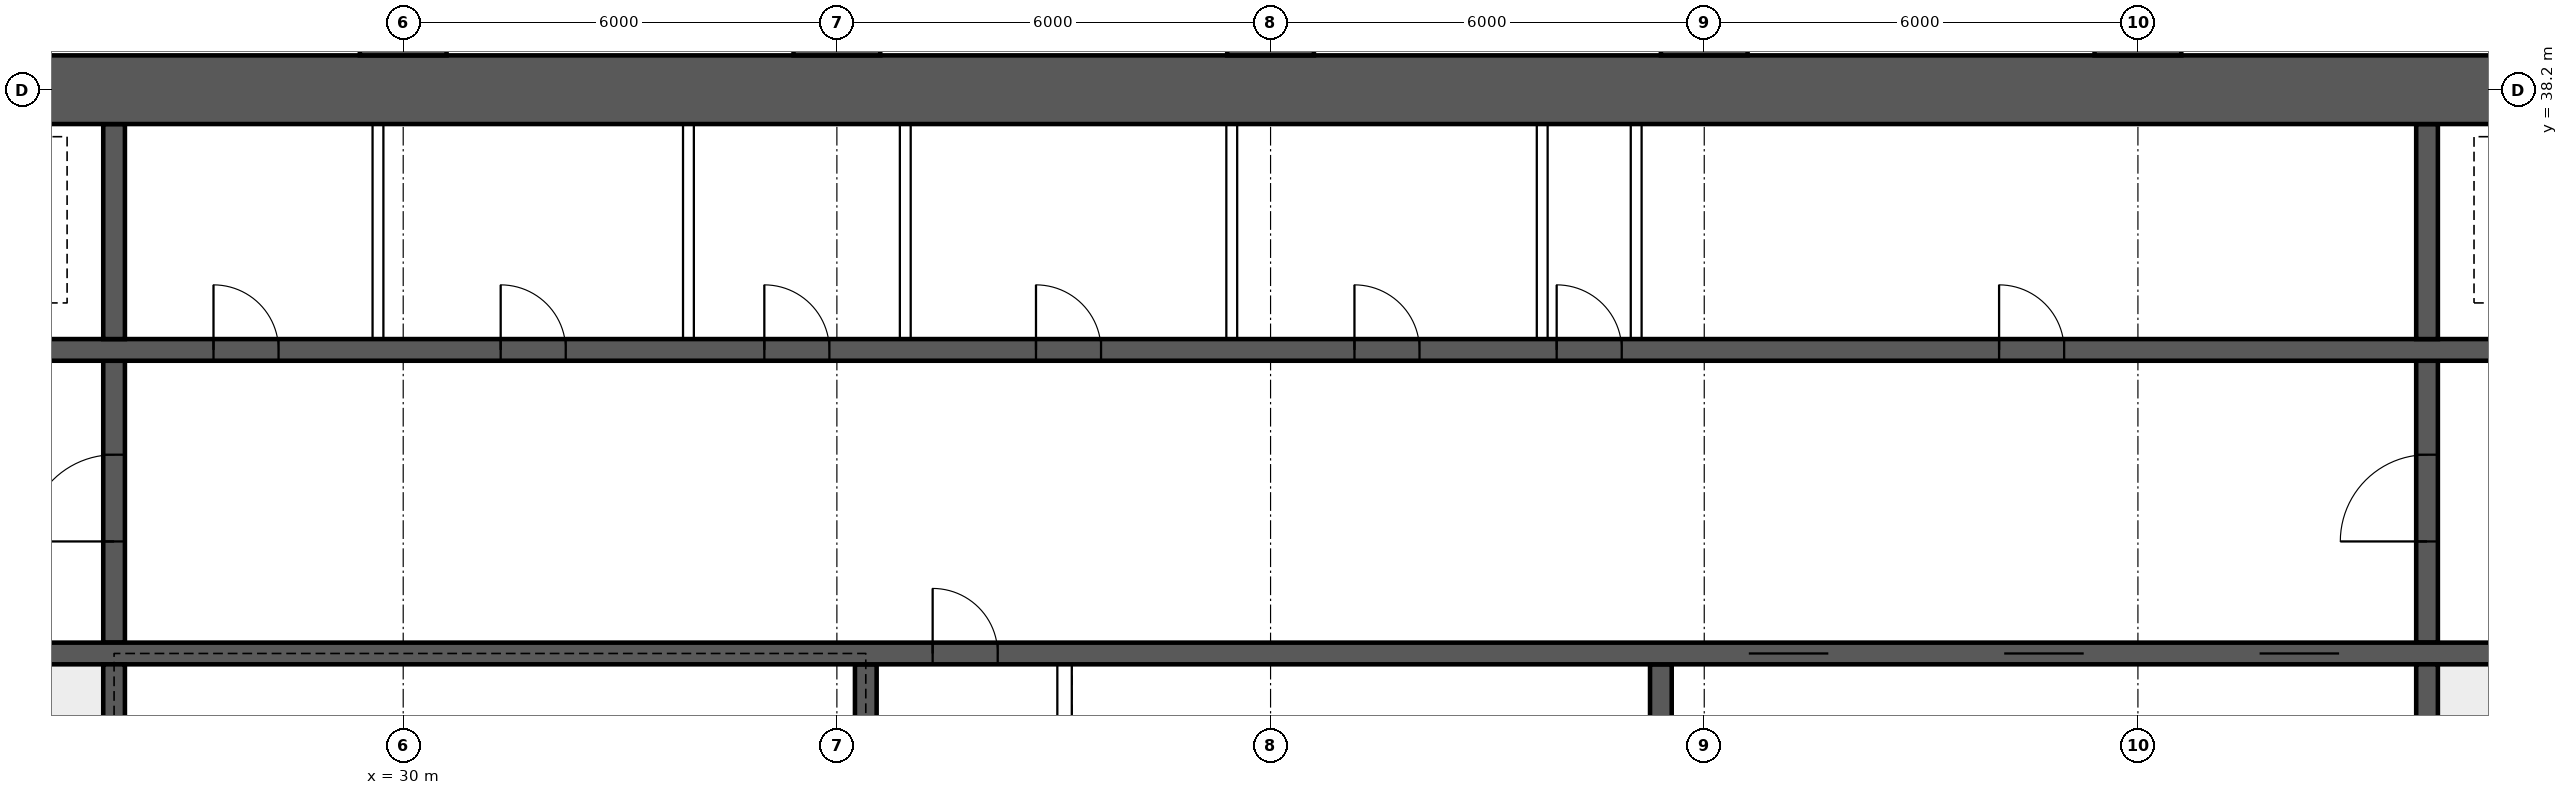
"""IFC4 building model, lengths in metres.
Left out: names, types, materials, properties, quantities, classifications, styles, units other than length and angle.
Written with IfcOpenShell. Run it as: python <this file> out.ifc"""

import sys

from ifc_helpers import new_model, si_unit, direction, frame, frame_2d, origin, place, context, subcontext, project, spatial, rectangle, extrude, element, fill, save


model = new_model("IFC4")
c1 = context("Model", 3, precision=1e-05, world=origin(), true_north=direction((0.0, 1.0)))
c2 = subcontext(c1, "Body", "Model", "MODEL_VIEW")
j1 = project(units=[si_unit("LENGTHUNIT", "METRE"), si_unit("PLANEANGLEUNIT", "RADIAN")], contexts=[c1])
p1 = place(None, origin())
s1 = spatial("IfcSite", under=j1, at=p1, CompositionType="ELEMENT")
p2 = place(p1, origin())
s2 = spatial("IfcBuilding", under=s1, at=p2, CompositionType="ELEMENT")
p3 = place(p2, frame((0.0, 0.0, 133.15)))
s3 = spatial("IfcBuildingStorey", under=s2, at=p3, CompositionType="ELEMENT", Elevation=133.15)
p4 = place(p3, frame((18.0, 38.2, 0.0), z_axis=(0.0, 0.0, 1.0), x_axis=(1.0, 0.0, 0.0)))
e1 = element("IfcWall", 1, at=p4, inside=s3, PredefinedType="SHEAR", context=c2, shape_type="SweptSolid", body=[
    extrude(rectangle(XDim=48.0, YDim=0.95, at=frame_2d((24.0, 0.0))), origin(), (0.0, 0.0, 1.0), 7.2),
])
p5 = place(p3, frame((18.475, 30.4, 0.0), z_axis=(0.0, 0.0, 1.0), x_axis=(1.0, 0.0, 0.0)))
e2 = element("IfcWall", 2, at=p5, inside=s3, PredefinedType="SHEAR", context=c2, shape_type="SweptSolid", body=[
    extrude(rectangle(XDim=47.05, YDim=0.3, at=frame_2d((23.525, 0.0))), origin(), (0.0, 0.0, 1.0), 7.2),
])
p6 = place(p5, frame((0.4, 0.0, 0.0)))
e3 = element("IfcOpeningElement", 3, at=p6, cuts=e2, PredefinedType="OPENING", context=c2, shape_type="SweptSolid", body=[
    extrude(rectangle(XDim=1.0, YDim=2.1, at=frame_2d((0.5, 1.05))), frame((0.0, 0.16, 0.0), z_axis=(0.0, -1.0, 0.0), x_axis=(1.0, 0.0, 0.0)), (0.0, 0.0, 1.0), 0.32),
])
p7 = place(p5, frame((45.65, 0.0, 0.0)))
e4 = element("IfcOpeningElement", 4, at=p7, cuts=e2, PredefinedType="OPENING", context=c2, shape_type="SweptSolid", body=[
    extrude(rectangle(XDim=1.0, YDim=2.1, at=frame_2d((0.5, 1.05))), frame((0.0, 0.16, 0.0), z_axis=(0.0, -1.0, 0.0), x_axis=(1.0, 0.0, 0.0)), (0.0, 0.0, 1.0), 0.32),
])
p8 = place(p5, frame((18.85, 0.0, 0.0)))
e5 = element("IfcOpeningElement", 5, at=p8, cuts=e2, PredefinedType="OPENING", context=c2, shape_type="SweptSolid", body=[
    extrude(rectangle(XDim=0.9, YDim=2.1, at=frame_2d((0.45, 1.05))), frame((0.0, 0.16, 0.0), z_axis=(0.0, -1.0, 0.0), x_axis=(1.0, 0.0, 0.0)), (0.0, 0.0, 1.0), 0.32),
])
p9 = place(p5, frame((30.142, 0.0, 0.0)))
e6 = element("IfcOpeningElement", 6, at=p9, cuts=e2, PredefinedType="OPENING", context=c2, shape_type="SweptSolid", body=[
    extrude(rectangle(XDim=1.1, YDim=2.1, at=frame_2d((0.55, 1.05))), frame((0.0, 0.16, 0.0), z_axis=(0.0, -1.0, 0.0), x_axis=(1.0, 0.0, 0.0)), (0.0, 0.0, 1.0), 0.32),
])
p10 = place(p5, frame((33.675, 0.0, 0.0)))
e7 = element("IfcOpeningElement", 7, at=p10, cuts=e2, PredefinedType="OPENING", context=c2, shape_type="SweptSolid", body=[
    extrude(rectangle(XDim=1.1, YDim=2.1, at=frame_2d((0.55, 1.05))), frame((0.0, 0.16, 0.0), z_axis=(0.0, -1.0, 0.0), x_axis=(1.0, 0.0, 0.0)), (0.0, 0.0, 1.0), 0.32),
])
p11 = place(p5, frame((37.208, 0.0, 0.0)))
e8 = element("IfcOpeningElement", 8, at=p11, cuts=e2, PredefinedType="OPENING", context=c2, shape_type="SweptSolid", body=[
    extrude(rectangle(XDim=1.1, YDim=2.1, at=frame_2d((0.55, 1.05))), frame((0.0, 0.16, 0.0), z_axis=(0.0, -1.0, 0.0), x_axis=(1.0, 0.0, 0.0)), (0.0, 0.0, 1.0), 0.32),
])
p12 = place(p3, frame((18.475, 34.6, 0.0), z_axis=(0.0, 0.0, 1.0), x_axis=(1.0, 0.0, 0.0)))
e9 = element("IfcWall", 9, at=p12, inside=s3, PredefinedType="SHEAR", context=c2, shape_type="SweptSolid", body=[
    extrude(rectangle(XDim=47.05, YDim=0.3, at=frame_2d((23.525, 0.0))), origin(), (0.0, 0.0, 1.0), 7.2),
])
p13 = place(p12, frame((0.9, 0.0, 0.0)))
e10 = element("IfcOpeningElement", 10, at=p13, cuts=e9, PredefinedType="OPENING", context=c2, shape_type="SweptSolid", body=[
    extrude(rectangle(XDim=1.1, YDim=2.1, at=frame_2d((0.55, 1.05))), frame((0.0, 0.16, 0.0), z_axis=(0.0, -1.0, 0.0), x_axis=(1.0, 0.0, 0.0)), (0.0, 0.0, 1.0), 0.32),
])
p14 = place(p12, frame((45.05, 0.0, 0.0)))
e11 = element("IfcOpeningElement", 11, at=p14, cuts=e9, PredefinedType="OPENING", context=c2, shape_type="SweptSolid", body=[
    extrude(rectangle(XDim=1.1, YDim=2.1, at=frame_2d((0.55, 1.05))), frame((0.0, 0.16, 0.0), z_axis=(0.0, -1.0, 0.0), x_axis=(1.0, 0.0, 0.0)), (0.0, 0.0, 1.0), 0.32),
])
p15 = place(p12, frame((4.125, 0.0, 0.0)))
e12 = element("IfcOpeningElement", 12, at=p15, cuts=e9, PredefinedType="OPENING", context=c2, shape_type="SweptSolid", body=[
    extrude(rectangle(XDim=0.9, YDim=2.1, at=frame_2d((0.45, 1.05))), frame((0.0, 0.16, 0.0), z_axis=(0.0, -1.0, 0.0), x_axis=(1.0, 0.0, 0.0)), (0.0, 0.0, 1.0), 0.32),
])
p16 = place(p12, frame((42.025, 0.0, 0.0)))
e13 = element("IfcOpeningElement", 13, at=p16, cuts=e9, PredefinedType="OPENING", context=c2, shape_type="SweptSolid", body=[
    extrude(rectangle(XDim=0.9, YDim=2.1, at=frame_2d((0.45, 1.05))), frame((0.0, 0.16, 0.0), z_axis=(0.0, -1.0, 0.0), x_axis=(1.0, 0.0, 0.0)), (0.0, 0.0, 1.0), 0.32),
])
p17 = place(p12, frame((8.9, 0.0, 0.0)))
e14 = element("IfcOpeningElement", 14, at=p17, cuts=e9, PredefinedType="OPENING", context=c2, shape_type="SweptSolid", body=[
    extrude(rectangle(XDim=0.9, YDim=2.1, at=frame_2d((0.45, 1.05))), frame((0.0, 0.16, 0.0), z_axis=(0.0, -1.0, 0.0), x_axis=(1.0, 0.0, 0.0)), (0.0, 0.0, 1.0), 0.32),
])
p18 = place(p12, frame((12.874, 0.0, 0.0)))
e15 = element("IfcOpeningElement", 15, at=p18, cuts=e9, PredefinedType="OPENING", context=c2, shape_type="SweptSolid", body=[
    extrude(rectangle(XDim=0.9, YDim=2.1, at=frame_2d((0.45, 1.05))), frame((0.0, 0.16, 0.0), z_axis=(0.0, -1.0, 0.0), x_axis=(1.0, 0.0, 0.0)), (0.0, 0.0, 1.0), 0.32),
])
p19 = place(p12, frame((16.521, 0.0, 0.0)))
e16 = element("IfcOpeningElement", 16, at=p19, cuts=e9, PredefinedType="OPENING", context=c2, shape_type="SweptSolid", body=[
    extrude(rectangle(XDim=0.9, YDim=2.1, at=frame_2d((0.45, 1.05))), frame((0.0, 0.16, 0.0), z_axis=(0.0, -1.0, 0.0), x_axis=(1.0, 0.0, 0.0)), (0.0, 0.0, 1.0), 0.32),
])
p20 = place(p12, frame((20.28, 0.0, 0.0)))
e17 = element("IfcOpeningElement", 17, at=p20, cuts=e9, PredefinedType="OPENING", context=c2, shape_type="SweptSolid", body=[
    extrude(rectangle(XDim=0.9, YDim=2.1, at=frame_2d((0.45, 1.05))), frame((0.0, 0.16, 0.0), z_axis=(0.0, -1.0, 0.0), x_axis=(1.0, 0.0, 0.0)), (0.0, 0.0, 1.0), 0.32),
])
p21 = place(p12, frame((24.686, 0.0, 0.0)))
e18 = element("IfcOpeningElement", 18, at=p21, cuts=e9, PredefinedType="OPENING", context=c2, shape_type="SweptSolid", body=[
    extrude(rectangle(XDim=0.9, YDim=2.1, at=frame_2d((0.45, 1.05))), frame((0.0, 0.16, 0.0), z_axis=(0.0, -1.0, 0.0), x_axis=(1.0, 0.0, 0.0)), (0.0, 0.0, 1.0), 0.32),
])
p22 = place(p12, frame((27.483, 0.0, 0.0)))
e19 = element("IfcOpeningElement", 19, at=p22, cuts=e9, PredefinedType="OPENING", context=c2, shape_type="SweptSolid", body=[
    extrude(rectangle(XDim=0.9, YDim=2.1, at=frame_2d((0.45, 1.05))), frame((0.0, 0.16, 0.0), z_axis=(0.0, -1.0, 0.0), x_axis=(1.0, 0.0, 0.0)), (0.0, 0.0, 1.0), 0.32),
])
p23 = place(p12, frame((33.604, 0.0, 0.0)))
e20 = element("IfcOpeningElement", 20, at=p23, cuts=e9, PredefinedType="OPENING", context=c2, shape_type="SweptSolid", body=[
    extrude(rectangle(XDim=0.9, YDim=2.1, at=frame_2d((0.45, 1.05))), frame((0.0, 0.16, 0.0), z_axis=(0.0, -1.0, 0.0), x_axis=(1.0, 0.0, 0.0)), (0.0, 0.0, 1.0), 0.32),
])
for number, where, z_axis, x_axis in (
    (21, (26.0, 26.275, 0.0), (0.0, 0.0, 1.0), (0.0, 1.0, 0.0)),
    (22, (58.0, 26.275, 0.0), (0.0, 0.0, 1.0), (0.0, 1.0, 0.0)),
):
    element("IfcWall", number, at=place(p3, frame(where, z_axis=z_axis, x_axis=x_axis)), inside=s3, PredefinedType="SHEAR", context=c2, shape_type="SweptSolid", body=[
        extrude(rectangle(XDim=3.975, YDim=0.3, at=frame_2d((1.988, 0.0))), origin(), (0.0, 0.0, 1.0), 7.2),
    ])
p24 = place(p3, frame((26.0, 30.55, 0.0), z_axis=(0.0, 0.0, 1.0), x_axis=(0.0, 1.0, 0.0)))
e23 = element("IfcWall", 23, at=p24, inside=s3, PredefinedType="SHEAR", context=c2, shape_type="SweptSolid", body=[
    extrude(rectangle(XDim=3.9, YDim=0.3, at=frame_2d((1.95, 0.0))), origin(), (0.0, 0.0, 1.0), 7.2),
])
p25 = place(p24, frame((1.4, 0.0, 0.0)))
e24 = element("IfcOpeningElement", 24, at=p25, cuts=e23, PredefinedType="OPENING", context=c2, shape_type="SweptSolid", body=[
    extrude(rectangle(XDim=1.2, YDim=2.1, at=frame_2d((0.6, 1.05))), frame((0.0, 0.16, 0.0), z_axis=(0.0, -1.0, 0.0), x_axis=(1.0, 0.0, 0.0)), (0.0, 0.0, 1.0), 0.32),
])
p26 = place(p3, frame((58.0, 30.55, 0.0), z_axis=(0.0, 0.0, 1.0), x_axis=(0.0, 1.0, 0.0)))
e25 = element("IfcWall", 25, at=p26, inside=s3, PredefinedType="SHEAR", context=c2, shape_type="SweptSolid", body=[
    extrude(rectangle(XDim=3.9, YDim=0.3, at=frame_2d((1.95, 0.0))), origin(), (0.0, 0.0, 1.0), 7.2),
])
p27 = place(p26, frame((1.4, 0.0, 0.0)))
e26 = element("IfcOpeningElement", 26, at=p27, cuts=e25, PredefinedType="OPENING", context=c2, shape_type="SweptSolid", body=[
    extrude(rectangle(XDim=1.2, YDim=2.1, at=frame_2d((0.6, 1.05))), frame((0.0, 0.16, 0.0), z_axis=(0.0, -1.0, 0.0), x_axis=(1.0, 0.0, 0.0)), (0.0, 0.0, 1.0), 0.32),
])
for number, where, z_axis, x_axis in (
    (27, (26.0, 34.75, 0.0), (0.0, 0.0, 1.0), (0.0, 1.0, 0.0)),
    (28, (58.0, 34.75, 0.0), (0.0, 0.0, 1.0), (0.0, 1.0, 0.0)),
):
    element("IfcWall", number, at=place(p3, frame(where, z_axis=z_axis, x_axis=x_axis)), inside=s3, PredefinedType="SHEAR", context=c2, shape_type="SweptSolid", body=[
        extrude(rectangle(XDim=2.975, YDim=0.3, at=frame_2d((1.488, 0.0))), origin(), (0.0, 0.0, 1.0), 7.2),
    ])
for number, where, z_axis, x_axis in (
    (29, (36.4, 26.275, 0.0), (0.0, 0.0, 1.0), (0.0, 1.0, 0.0)),
    (30, (47.4, 26.275, 0.0), (0.0, 0.0, 1.0), (0.0, 1.0, 0.0)),
):
    element("IfcWall", number, at=place(p3, frame(where, z_axis=z_axis, x_axis=x_axis)), inside=s3, PredefinedType="SHEAR", context=c2, shape_type="SweptSolid", body=[
        extrude(rectangle(XDim=3.975, YDim=0.3, at=frame_2d((1.988, 0.0))), origin(), (0.0, 0.0, 1.0), 7.2),
    ])
p28 = place(p3, frame((30.0, 38.675, 0.0), z_axis=(0.0, 0.0, 1.0), x_axis=(0.0, 1.0, 0.0)))
e31 = element("IfcWall", 31, at=p28, inside=s3, PredefinedType="SHEAR", context=c2, shape_type="SweptSolid", body=[
    extrude(rectangle(XDim=16.425, YDim=1.2, at=frame_2d((8.212, 0.0))), origin(), (0.0, 0.0, 1.0), 7.2),
])
p29 = place(p28, frame((0.3, 0.0, 0.0)))
e32 = element("IfcOpeningElement", 32, at=p29, cuts=e31, PredefinedType="OPENING", context=c2, shape_type="SweptSolid", body=[
    extrude(rectangle(XDim=1.2, YDim=2.1, at=frame_2d((0.6, 1.05))), frame((0.0, 0.61, 0.0), z_axis=(0.0, -1.0, 0.0), x_axis=(1.0, 0.0, 0.0)), (0.0, 0.0, 1.0), 1.22),
])
p30 = place(p3, frame((36.0, 38.675, 0.0), z_axis=(0.0, 0.0, 1.0), x_axis=(0.0, 1.0, 0.0)))
e33 = element("IfcWall", 33, at=p30, inside=s3, PredefinedType="SHEAR", context=c2, shape_type="SweptSolid", body=[
    extrude(rectangle(XDim=16.425, YDim=1.2, at=frame_2d((8.212, 0.0))), origin(), (0.0, 0.0, 1.0), 7.2),
])
p31 = place(p30, frame((0.3, 0.0, 0.0)))
e34 = element("IfcOpeningElement", 34, at=p31, cuts=e33, PredefinedType="OPENING", context=c2, shape_type="SweptSolid", body=[
    extrude(rectangle(XDim=1.2, YDim=2.1, at=frame_2d((0.6, 1.05))), frame((0.0, 0.61, 0.0), z_axis=(0.0, -1.0, 0.0), x_axis=(1.0, 0.0, 0.0)), (0.0, 0.0, 1.0), 1.22),
])
p32 = place(p3, frame((42.0, 38.675, 0.0), z_axis=(0.0, 0.0, 1.0), x_axis=(0.0, 1.0, 0.0)))
e35 = element("IfcWall", 35, at=p32, inside=s3, PredefinedType="SHEAR", context=c2, shape_type="SweptSolid", body=[
    extrude(rectangle(XDim=16.425, YDim=1.2, at=frame_2d((8.212, 0.0))), origin(), (0.0, 0.0, 1.0), 7.2),
])
p33 = place(p32, frame((0.3, 0.0, 0.0)))
e36 = element("IfcOpeningElement", 36, at=p33, cuts=e35, PredefinedType="OPENING", context=c2, shape_type="SweptSolid", body=[
    extrude(rectangle(XDim=1.2, YDim=2.1, at=frame_2d((0.6, 1.05))), frame((0.0, 0.61, 0.0), z_axis=(0.0, -1.0, 0.0), x_axis=(1.0, 0.0, 0.0)), (0.0, 0.0, 1.0), 1.22),
])
p34 = place(p3, frame((48.0, 38.675, 0.0), z_axis=(0.0, 0.0, 1.0), x_axis=(0.0, 1.0, 0.0)))
e37 = element("IfcWall", 37, at=p34, inside=s3, PredefinedType="SHEAR", context=c2, shape_type="SweptSolid", body=[
    extrude(rectangle(XDim=16.425, YDim=1.2, at=frame_2d((8.212, 0.0))), origin(), (0.0, 0.0, 1.0), 7.2),
])
p35 = place(p34, frame((0.3, 0.0, 0.0)))
e38 = element("IfcOpeningElement", 38, at=p35, cuts=e37, PredefinedType="OPENING", context=c2, shape_type="SweptSolid", body=[
    extrude(rectangle(XDim=1.2, YDim=2.1, at=frame_2d((0.6, 1.05))), frame((0.0, 0.61, 0.0), z_axis=(0.0, -1.0, 0.0), x_axis=(1.0, 0.0, 0.0)), (0.0, 0.0, 1.0), 1.22),
])
p36 = place(p3, frame((54.0, 38.675, 0.0), z_axis=(0.0, 0.0, 1.0), x_axis=(0.0, 1.0, 0.0)))
e39 = element("IfcWall", 39, at=p36, inside=s3, PredefinedType="SHEAR", context=c2, shape_type="SweptSolid", body=[
    extrude(rectangle(XDim=16.425, YDim=1.2, at=frame_2d((8.212, 0.0))), origin(), (0.0, 0.0, 1.0), 7.2),
])
p37 = place(p36, frame((0.3, 0.0, 0.0)))
e40 = element("IfcOpeningElement", 40, at=p37, cuts=e39, PredefinedType="OPENING", context=c2, shape_type="SweptSolid", body=[
    extrude(rectangle(XDim=1.2, YDim=2.1, at=frame_2d((0.6, 1.05))), frame((0.0, 0.61, 0.0), z_axis=(0.0, -1.0, 0.0), x_axis=(1.0, 0.0, 0.0)), (0.0, 0.0, 1.0), 1.22),
])
for number, where, z_axis, x_axis in (
    (41, (29.651, 34.75, 0.0), (0.0, 0.0, 1.0), (0.0, 1.0, 0.0)),
    (42, (33.946, 34.75, 0.0), (0.0, 0.0, 1.0), (0.0, 1.0, 0.0)),
    (43, (36.946, 34.75, 0.0), (0.0, 0.0, 1.0), (0.0, 1.0, 0.0)),
    (44, (41.463, 34.75, 0.0), (0.0, 0.0, 1.0), (0.0, 1.0, 0.0)),
    (45, (45.758, 34.75, 0.0), (0.0, 0.0, 1.0), (0.0, 1.0, 0.0)),
    (46, (47.058, 34.75, 0.0), (0.0, 0.0, 1.0), (0.0, 1.0, 0.0)),
):
    element("IfcWall", number, at=place(p3, frame(where, z_axis=z_axis, x_axis=x_axis)), inside=s3, PredefinedType="SOLIDWALL", context=c2, shape_type="SweptSolid", body=[
        extrude(rectangle(XDim=2.975, YDim=0.15, at=frame_2d((1.488, 0.0))), origin(), (0.0, 0.0, 1.0), 6.9),
    ])
p38 = place(p3, frame((39.15, 26.275, 0.0), z_axis=(0.0, 0.0, 1.0), x_axis=(0.0, 1.0, 0.0)))
e47 = element("IfcWall", 47, at=p38, inside=s3, PredefinedType="SOLIDWALL", context=c2, shape_type="SweptSolid", body=[
    extrude(rectangle(XDim=3.975, YDim=0.2, at=frame_2d((1.988, 0.0))), origin(), (0.0, 0.0, 1.0), 6.9),
])
p39 = place(p25, origin())
e48 = element("IfcDoor", 48, at=p39, inside=s3, OperationType="SINGLE_SWING_LEFT", PredefinedType="DOOR", context=c2, shape_type="SweptSolid", body=[
    extrude(rectangle(XDim=1.2, YDim=2.1, at=frame_2d((0.6, 1.05))), frame((0.0, 0.025, 0.0), z_axis=(0.0, -1.0, 0.0), x_axis=(1.0, 0.0, 0.0)), (0.0, 0.0, 1.0), 0.05),
])
fill(e24, e48)
p40 = place(p27, origin())
e49 = element("IfcDoor", 49, at=p40, inside=s3, OperationType="SINGLE_SWING_LEFT", PredefinedType="DOOR", context=c2, shape_type="SweptSolid", body=[
    extrude(rectangle(XDim=1.2, YDim=2.1, at=frame_2d((0.6, 1.05))), frame((0.0, 0.025, 0.0), z_axis=(0.0, -1.0, 0.0), x_axis=(1.0, 0.0, 0.0)), (0.0, 0.0, 1.0), 0.05),
])
fill(e26, e49)
p41 = place(p17, origin())
e50 = element("IfcDoor", 50, at=p41, inside=s3, OperationType="SINGLE_SWING_LEFT", PredefinedType="DOOR", context=c2, shape_type="SweptSolid", body=[
    extrude(rectangle(XDim=0.9, YDim=2.1, at=frame_2d((0.45, 1.05))), frame((0.0, 0.025, 0.0), z_axis=(0.0, -1.0, 0.0), x_axis=(1.0, 0.0, 0.0)), (0.0, 0.0, 1.0), 0.05),
])
fill(e14, e50)
p42 = place(p18, origin())
e51 = element("IfcDoor", 51, at=p42, inside=s3, OperationType="SINGLE_SWING_LEFT", PredefinedType="DOOR", context=c2, shape_type="SweptSolid", body=[
    extrude(rectangle(XDim=0.9, YDim=2.1, at=frame_2d((0.45, 1.05))), frame((0.0, 0.025, 0.0), z_axis=(0.0, -1.0, 0.0), x_axis=(1.0, 0.0, 0.0)), (0.0, 0.0, 1.0), 0.05),
])
fill(e15, e51)
p43 = place(p19, origin())
e52 = element("IfcDoor", 52, at=p43, inside=s3, OperationType="SINGLE_SWING_LEFT", PredefinedType="DOOR", context=c2, shape_type="SweptSolid", body=[
    extrude(rectangle(XDim=0.9, YDim=2.1, at=frame_2d((0.45, 1.05))), frame((0.0, 0.025, 0.0), z_axis=(0.0, -1.0, 0.0), x_axis=(1.0, 0.0, 0.0)), (0.0, 0.0, 1.0), 0.05),
])
fill(e16, e52)
p44 = place(p20, origin())
e53 = element("IfcDoor", 53, at=p44, inside=s3, OperationType="SINGLE_SWING_LEFT", PredefinedType="DOOR", context=c2, shape_type="SweptSolid", body=[
    extrude(rectangle(XDim=0.9, YDim=2.1, at=frame_2d((0.45, 1.05))), frame((0.0, 0.025, 0.0), z_axis=(0.0, -1.0, 0.0), x_axis=(1.0, 0.0, 0.0)), (0.0, 0.0, 1.0), 0.05),
])
fill(e17, e53)
p45 = place(p21, origin())
e54 = element("IfcDoor", 54, at=p45, inside=s3, OperationType="SINGLE_SWING_LEFT", PredefinedType="DOOR", context=c2, shape_type="SweptSolid", body=[
    extrude(rectangle(XDim=0.9, YDim=2.1, at=frame_2d((0.45, 1.05))), frame((0.0, 0.025, 0.0), z_axis=(0.0, -1.0, 0.0), x_axis=(1.0, 0.0, 0.0)), (0.0, 0.0, 1.0), 0.05),
])
fill(e18, e54)
p46 = place(p22, origin())
e55 = element("IfcDoor", 55, at=p46, inside=s3, OperationType="SINGLE_SWING_LEFT", PredefinedType="DOOR", context=c2, shape_type="SweptSolid", body=[
    extrude(rectangle(XDim=0.9, YDim=2.1, at=frame_2d((0.45, 1.05))), frame((0.0, 0.025, 0.0), z_axis=(0.0, -1.0, 0.0), x_axis=(1.0, 0.0, 0.0)), (0.0, 0.0, 1.0), 0.05),
])
fill(e19, e55)
p47 = place(p23, origin())
e56 = element("IfcDoor", 56, at=p47, inside=s3, OperationType="SINGLE_SWING_LEFT", PredefinedType="DOOR", context=c2, shape_type="SweptSolid", body=[
    extrude(rectangle(XDim=0.9, YDim=2.1, at=frame_2d((0.45, 1.05))), frame((0.0, 0.025, 0.0), z_axis=(0.0, -1.0, 0.0), x_axis=(1.0, 0.0, 0.0)), (0.0, 0.0, 1.0), 0.05),
])
fill(e20, e56)
p48 = place(p8, origin())
e57 = element("IfcDoor", 57, at=p48, inside=s3, OperationType="SINGLE_SWING_LEFT", PredefinedType="DOOR", context=c2, shape_type="SweptSolid", body=[
    extrude(rectangle(XDim=0.9, YDim=2.1, at=frame_2d((0.45, 1.05))), frame((0.0, 0.025, 0.0), z_axis=(0.0, -1.0, 0.0), x_axis=(1.0, 0.0, 0.0)), (0.0, 0.0, 1.0), 0.05),
])
fill(e5, e57)
p49 = place(p9, origin())
e58 = element("IfcDoor", 58, at=p49, inside=s3, OperationType="DOUBLE_DOOR_SLIDING", PredefinedType="DOOR", context=c2, shape_type="SweptSolid", body=[
    extrude(rectangle(XDim=1.1, YDim=2.1, at=frame_2d((0.55, 1.05))), frame((0.0, 0.025, 0.0), z_axis=(0.0, -1.0, 0.0), x_axis=(1.0, 0.0, 0.0)), (0.0, 0.0, 1.0), 0.05),
])
fill(e6, e58)
p50 = place(p10, origin())
e59 = element("IfcDoor", 59, at=p50, inside=s3, OperationType="DOUBLE_DOOR_SLIDING", PredefinedType="DOOR", context=c2, shape_type="SweptSolid", body=[
    extrude(rectangle(XDim=1.1, YDim=2.1, at=frame_2d((0.55, 1.05))), frame((0.0, 0.025, 0.0), z_axis=(0.0, -1.0, 0.0), x_axis=(1.0, 0.0, 0.0)), (0.0, 0.0, 1.0), 0.05),
])
fill(e7, e59)
p51 = place(p11, origin())
e60 = element("IfcDoor", 60, at=p51, inside=s3, OperationType="DOUBLE_DOOR_SLIDING", PredefinedType="DOOR", context=c2, shape_type="SweptSolid", body=[
    extrude(rectangle(XDim=1.1, YDim=2.1, at=frame_2d((0.55, 1.05))), frame((0.0, 0.025, 0.0), z_axis=(0.0, -1.0, 0.0), x_axis=(1.0, 0.0, 0.0)), (0.0, 0.0, 1.0), 0.05),
])
fill(e8, e60)
save(model, sys.argv[1])
